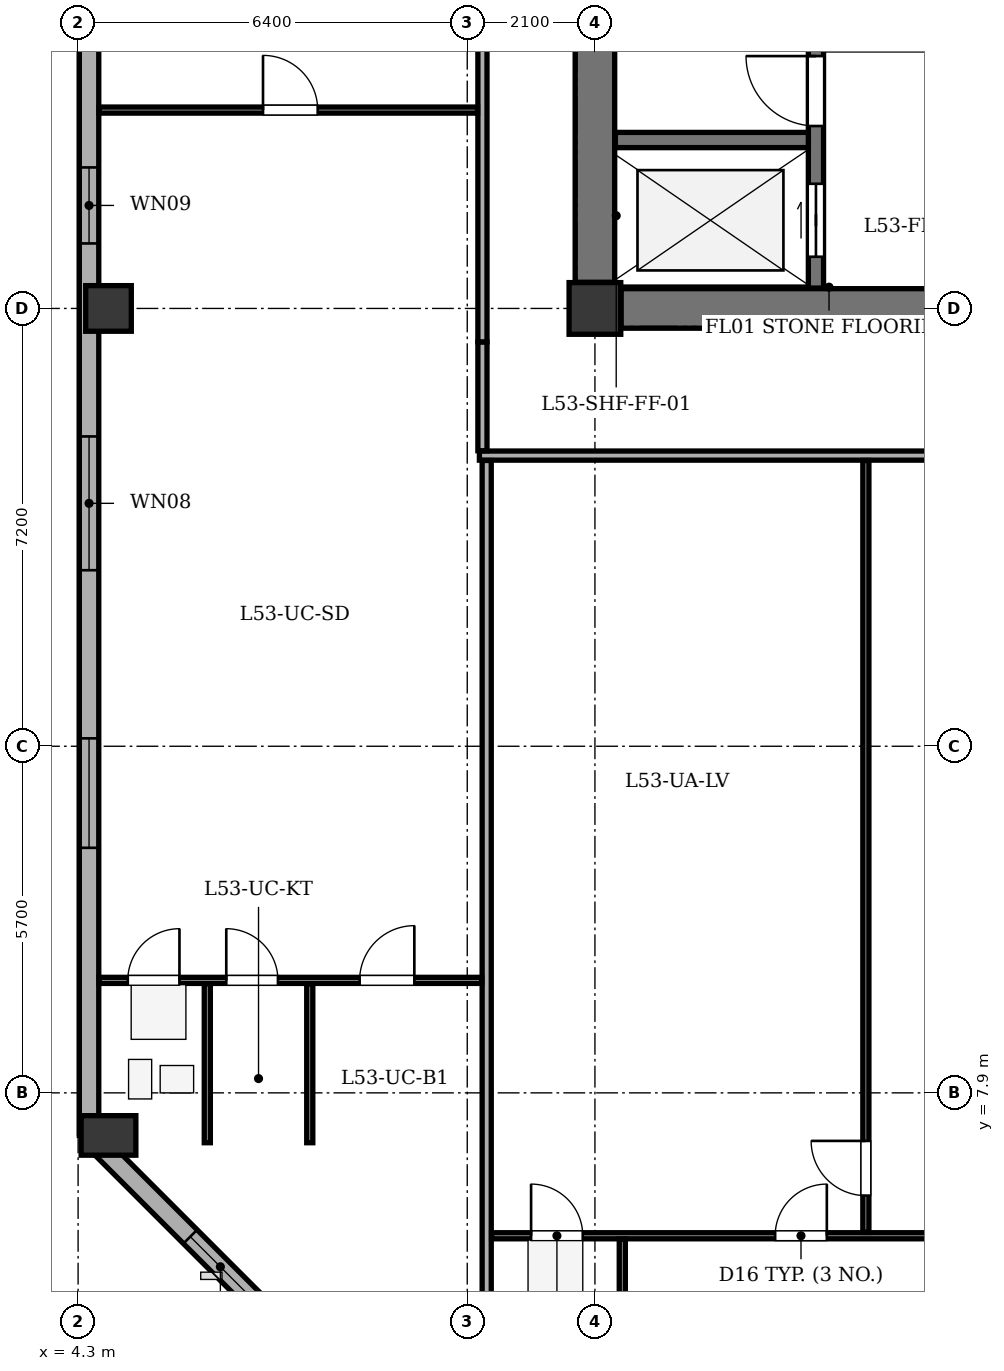
"""IFC4 building model, lengths in metres.
Left out: names, types, materials, properties, quantities, classifications, styles, units other than length and angle.
Written with IfcOpenShell. Run it as: python <this file> out.ifc"""

import sys

from ifc_helpers import new_model, si_unit, direction, frame, frame_2d, origin, origin_2d, place, context, subcontext, project, spatial, rectangle, extrude, element, fill, save


model = new_model("IFC4")
c1 = context("Model", 3, precision=1e-05, world=origin(), true_north=direction((0.0, 1.0)))
c2 = subcontext(c1, "Body", "Model", "MODEL_VIEW")
j1 = project(units=[si_unit("LENGTHUNIT", "METRE"), si_unit("PLANEANGLEUNIT", "RADIAN")], contexts=[c1])
p1 = place(None, origin())
s1 = spatial("IfcSite", under=j1, at=p1, CompositionType="ELEMENT")
p2 = place(p1, origin())
s2 = spatial("IfcBuilding", under=s1, at=p2, CompositionType="ELEMENT")
p3 = place(p2, frame((0.0, 0.0, 207.5)))
s3 = spatial("IfcBuildingStorey", under=s2, at=p3, CompositionType="ELEMENT", Elevation=207.5)
p4 = place(p3, frame((12.8, 20.8, 0.0), z_axis=(0.0, 0.0, 1.0), x_axis=(1.0, 0.0, 0.0)))
e1 = element("IfcColumn", 1, at=p4, inside=s3, PredefinedType="COLUMN", context=c2, shape_type="SweptSolid", body=[
    extrude(rectangle(XDim=0.85, YDim=0.85, at=origin_2d()), origin(), (0.0, 0.0, 1.0), 3.4),
])
p5 = place(p3, frame((4.8, 7.2, 0.0), z_axis=(0.0, 0.0, 1.0), x_axis=(1.0, 0.0, 0.0)))
e2 = element("IfcColumn", 2, at=p5, inside=s3, PredefinedType="COLUMN", context=c2, shape_type="SweptSolid", body=[
    extrude(rectangle(XDim=0.65, YDim=0.9, at=origin_2d()), origin(), (0.0, 0.0, 1.0), 3.4),
])
p6 = place(p3, frame((4.8, 20.8, 0.0), z_axis=(0.0, 0.0, 1.0), x_axis=(1.0, 0.0, 0.0)))
e3 = element("IfcColumn", 3, at=p6, inside=s3, PredefinedType="COLUMN", context=c2, shape_type="SweptSolid", body=[
    extrude(rectangle(XDim=0.75, YDim=0.75, at=origin_2d()), origin(), (0.0, 0.0, 1.0), 3.4),
])
p7 = place(p3, frame((8.8, 2.88, 0.0), z_axis=(0.0, 0.0, 1.0), x_axis=(-0.707106781187, 0.707106781187, 0.0)))
e4 = element("IfcWall", 4, at=p7, inside=s3, PredefinedType="STANDARD", context=c2, shape_type="SweptSolid", body=[
    extrude(rectangle(XDim=6.11, YDim=0.32, at=frame_2d((3.055, 0.0))), origin(), (0.0, 0.0, 1.0), 2.725),
])
p8 = place(p7, frame((2.355, 0.0, 0.75)))
e5 = element("IfcOpeningElement", 5, at=p8, cuts=e4, PredefinedType="OPENING", context=c2, shape_type="SweptSolid", body=[
    extrude(rectangle(XDim=1.4, YDim=1.65, at=frame_2d((0.7, 0.825))), frame((0.0, 0.17, 0.0), z_axis=(0.0, -1.0, 0.0), x_axis=(1.0, 0.0, 0.0)), (0.0, 0.0, 1.0), 0.34),
])
p9 = place(p3, frame((4.48, 7.2, 0.0), z_axis=(0.0, 0.0, 1.0), x_axis=(0.0, 1.0, 0.0)))
e6 = element("IfcWall", 6, at=p9, inside=s3, PredefinedType="STANDARD", context=c2, shape_type="SweptSolid", body=[
    extrude(rectangle(XDim=27.8, YDim=0.32, at=frame_2d((13.9, 0.0))), origin(), (0.0, 0.0, 1.0), 2.725),
])
p10 = place(p9, frame((4.73, 0.0, 0.75)))
e7 = element("IfcOpeningElement", 7, at=p10, cuts=e6, PredefinedType="OPENING", context=c2, shape_type="SweptSolid", body=[
    extrude(rectangle(XDim=1.8, YDim=1.7, at=frame_2d((0.9, 0.85))), frame((0.0, 0.17, 0.0), z_axis=(0.0, -1.0, 0.0), x_axis=(1.0, 0.0, 0.0)), (0.0, 0.0, 1.0), 0.34),
])
p11 = place(p9, frame((9.295, 0.0, 0.75)))
e8 = element("IfcOpeningElement", 8, at=p11, cuts=e6, PredefinedType="OPENING", context=c2, shape_type="SweptSolid", body=[
    extrude(rectangle(XDim=2.2, YDim=1.7, at=frame_2d((1.1, 0.85))), frame((0.0, 0.17, 0.0), z_axis=(0.0, -1.0, 0.0), x_axis=(1.0, 0.0, 0.0)), (0.0, 0.0, 1.0), 0.34),
])
p12 = place(p9, frame((14.669, 0.0, 0.75)))
e9 = element("IfcOpeningElement", 9, at=p12, cuts=e6, PredefinedType="OPENING", context=c2, shape_type="SweptSolid", body=[
    extrude(rectangle(XDim=1.25, YDim=1.7, at=frame_2d((0.625, 0.85))), frame((0.0, 0.17, 0.0), z_axis=(0.0, -1.0, 0.0), x_axis=(1.0, 0.0, 0.0)), (0.0, 0.0, 1.0), 0.34),
])
p13 = place(p9, frame((18.649, 0.0, 0.75)))
e10 = element("IfcOpeningElement", 10, at=p13, cuts=e6, PredefinedType="OPENING", context=c2, shape_type="SweptSolid", body=[
    extrude(rectangle(XDim=1.8, YDim=1.7, at=frame_2d((0.9, 0.85))), frame((0.0, 0.17, 0.0), z_axis=(0.0, -1.0, 0.0), x_axis=(1.0, 0.0, 0.0)), (0.0, 0.0, 1.0), 0.34),
])
p14 = place(p9, frame((22.488, 0.0, 0.75)))
e11 = element("IfcOpeningElement", 11, at=p14, cuts=e6, PredefinedType="OPENING", context=c2, shape_type="SweptSolid", body=[
    extrude(rectangle(XDim=2.2, YDim=1.7, at=frame_2d((1.1, 0.85))), frame((0.0, 0.17, 0.0), z_axis=(0.0, -1.0, 0.0), x_axis=(1.0, 0.0, 0.0)), (0.0, 0.0, 1.0), 0.34),
])
p15 = place(p3, frame((12.8, 21.23, 0.0), z_axis=(0.0, 0.0, 1.0), x_axis=(0.0, 1.0, 0.0)))
e12 = element("IfcWall", 12, at=p15, inside=s3, PredefinedType="SHEAR", context=c2, shape_type="SweptSolid", body=[
    extrude(rectangle(XDim=11.94, YDim=0.65, at=frame_2d((5.97, 0.0))), origin(), (0.0, 0.0, 1.0), 3.1),
])
p16 = place(p3, frame((13.23, 20.8, 0.0), z_axis=(0.0, 0.0, 1.0), x_axis=(1.0, 0.0, 0.0)))
e13 = element("IfcWall", 13, at=p16, inside=s3, PredefinedType="SHEAR", context=c2, shape_type="SweptSolid", body=[
    extrude(rectangle(XDim=7.14, YDim=0.65, at=frame_2d((3.57, 0.0))), origin(), (0.0, 0.0, 1.0), 3.1),
])
p17 = place(p3, frame((16.435, 21.135, 0.0), z_axis=(0.0, 0.0, 1.0), x_axis=(0.0, 1.0, 0.0)))
e14 = element("IfcWall", 14, at=p17, inside=s3, PredefinedType="SHEAR", context=c2, shape_type="SweptSolid", body=[
    extrude(rectangle(XDim=12.13, YDim=0.25, at=frame_2d((6.065, 0.0))), origin(), (0.0, 0.0, 1.0), 3.1),
])
p18 = place(p17, frame((0.515, 0.0, 0.0)))
e15 = element("IfcOpeningElement", 15, at=p18, cuts=e14, PredefinedType="OPENING", context=c2, shape_type="SweptSolid", body=[
    extrude(rectangle(XDim=1.2, YDim=2.15, at=frame_2d((0.6, 1.075))), frame((0.0, 0.135, 0.0), z_axis=(0.0, -1.0, 0.0), x_axis=(1.0, 0.0, 0.0)), (0.0, 0.0, 1.0), 0.27),
])
p19 = place(p17, frame((2.665, 0.0, 0.0)))
e16 = element("IfcOpeningElement", 16, at=p19, cuts=e14, PredefinedType="OPENING", context=c2, shape_type="SweptSolid", body=[
    extrude(rectangle(XDim=1.15, YDim=2.15, at=frame_2d((0.575, 1.075))), frame((0.0, 0.135, 0.0), z_axis=(0.0, -1.0, 0.0), x_axis=(1.0, 0.0, 0.0)), (0.0, 0.0, 1.0), 0.27),
])
p20 = place(p3, frame((13.135, 23.57, 0.0), z_axis=(0.0, 0.0, 1.0), x_axis=(1.0, 0.0, 0.0)))
e17 = element("IfcWall", 17, at=p20, inside=s3, PredefinedType="SHEAR", context=c2, shape_type="SweptSolid", body=[
    extrude(rectangle(XDim=3.175, YDim=0.25, at=frame_2d((1.587, 0.0))), origin(), (0.0, 0.0, 1.0), 3.1),
])
p21 = place(p3, frame((10.9, 18.38, 0.0), z_axis=(0.0, 0.0, 1.0), x_axis=(1.0, 0.0, 0.0)))
e18 = element("IfcWall", 18, at=p21, inside=s3, PredefinedType="PARTITIONING", context=c2, shape_type="SweptSolid", body=[
    extrude(rectangle(XDim=34.02, YDim=0.15, at=frame_2d((17.01, 0.0))), origin(), (0.0, 0.0, 1.0), 3.1),
])
p22 = place(p21, frame((7.727, 0.0, 0.0)))
e19 = element("IfcOpeningElement", 19, at=p22, cuts=e18, PredefinedType="OPENING", context=c2, shape_type="SweptSolid", body=[
    extrude(rectangle(XDim=1.0, YDim=2.1, at=frame_2d((0.5, 1.05))), frame((0.0, 0.085, 0.0), z_axis=(0.0, -1.0, 0.0), x_axis=(1.0, 0.0, 0.0)), (0.0, 0.0, 1.0), 0.17),
])
p23 = place(p21, frame((24.617, 0.0, 0.0)))
e20 = element("IfcOpeningElement", 20, at=p23, cuts=e18, PredefinedType="OPENING", context=c2, shape_type="SweptSolid", body=[
    extrude(rectangle(XDim=1.0, YDim=2.1, at=frame_2d((0.5, 1.05))), frame((0.0, 0.085, 0.0), z_axis=(0.0, -1.0, 0.0), x_axis=(1.0, 0.0, 0.0)), (0.0, 0.0, 1.0), 0.17),
])
p24 = place(p3, frame((11.02, 3.045, 0.0), z_axis=(0.0, 0.0, 1.0), x_axis=(0.0, 1.0, 0.0)))
e21 = element("IfcWall", 21, at=p24, inside=s3, PredefinedType="PARTITIONING", context=c2, shape_type="SweptSolid", body=[
    extrude(rectangle(XDim=15.255, YDim=0.15, at=frame_2d((7.627, 0.0))), origin(), (0.0, 0.0, 1.0), 3.1),
])
p25 = place(p3, frame((11.1, 5.55, 0.0), z_axis=(0.0, 0.0, 1.0), x_axis=(1.0, 0.0, 0.0)))
e22 = element("IfcWall", 22, at=p25, inside=s3, PredefinedType="PARTITIONING", context=c2, shape_type="SweptSolid", body=[
    extrude(rectangle(XDim=16.174, YDim=0.1, at=frame_2d((8.087, 0.0))), origin(), (0.0, 0.0, 1.0), 3.1),
])
p26 = place(p25, frame((0.65, 0.0, 0.0)))
e23 = element("IfcOpeningElement", 23, at=p26, cuts=e22, PredefinedType="OPENING", context=c2, shape_type="SweptSolid", body=[
    extrude(rectangle(XDim=0.85, YDim=2.05, at=frame_2d((0.425, 1.025))), frame((0.0, 0.06, 0.0), z_axis=(0.0, -1.0, 0.0), x_axis=(1.0, 0.0, 0.0)), (0.0, 0.0, 1.0), 0.12),
])
p27 = place(p25, frame((4.664, 0.0, 0.0)))
e24 = element("IfcOpeningElement", 24, at=p27, cuts=e22, PredefinedType="OPENING", context=c2, shape_type="SweptSolid", body=[
    extrude(rectangle(XDim=0.85, YDim=2.05, at=frame_2d((0.425, 1.025))), frame((0.0, 0.06, 0.0), z_axis=(0.0, -1.0, 0.0), x_axis=(1.0, 0.0, 0.0)), (0.0, 0.0, 1.0), 0.12),
])
p28 = place(p25, frame((9.584, 0.0, 0.0)))
e25 = element("IfcOpeningElement", 25, at=p28, cuts=e22, PredefinedType="OPENING", context=c2, shape_type="SweptSolid", body=[
    extrude(rectangle(XDim=0.9, YDim=2.05, at=frame_2d((0.45, 1.025))), frame((0.0, 0.06, 0.0), z_axis=(0.0, -1.0, 0.0), x_axis=(1.0, 0.0, 0.0)), (0.0, 0.0, 1.0), 0.12),
])
p29 = place(p25, frame((13.598, 0.0, 0.0)))
e26 = element("IfcOpeningElement", 26, at=p29, cuts=e22, PredefinedType="OPENING", context=c2, shape_type="SweptSolid", body=[
    extrude(rectangle(XDim=0.9, YDim=2.05, at=frame_2d((0.45, 1.025))), frame((0.0, 0.06, 0.0), z_axis=(0.0, -1.0, 0.0), x_axis=(1.0, 0.0, 0.0)), (0.0, 0.0, 1.0), 0.12),
])
p30 = place(p3, frame((17.256, 5.605, 0.0), z_axis=(0.0, 0.0, 1.0), x_axis=(0.0, 1.0, 0.0)))
e27 = element("IfcWall", 27, at=p30, inside=s3, PredefinedType="PARTITIONING", context=c2, shape_type="SweptSolid", body=[
    extrude(rectangle(XDim=12.695, YDim=0.1, at=frame_2d((6.348, 0.0))), origin(), (0.0, 0.0, 1.0), 3.1),
])
p31 = place(p30, frame((0.605, 0.0, 0.0)))
e28 = element("IfcOpeningElement", 28, at=p31, cuts=e27, PredefinedType="OPENING", context=c2, shape_type="SweptSolid", body=[
    extrude(rectangle(XDim=0.9, YDim=2.05, at=frame_2d((0.45, 1.025))), frame((0.0, 0.06, 0.0), z_axis=(0.0, -1.0, 0.0), x_axis=(1.0, 0.0, 0.0)), (0.0, 0.0, 1.0), 0.12),
])
p32 = place(p3, frame((13.25, 3.045, 0.0), z_axis=(0.0, 0.0, 1.0), x_axis=(0.0, 1.0, 0.0)))
e29 = element("IfcWall", 29, at=p32, inside=s3, PredefinedType="PARTITIONING", context=c2, shape_type="SweptSolid", body=[
    extrude(rectangle(XDim=2.45, YDim=0.1, at=frame_2d((1.225, 0.0))), origin(), (0.0, 0.0, 1.0), 3.1),
])
p33 = place(p3, frame((10.95, 18.46, 0.0), z_axis=(0.0, 0.0, 1.0), x_axis=(0.0, 1.0, 0.0)))
e30 = element("IfcWall", 30, at=p33, inside=s3, PredefinedType="PARTITIONING", context=c2, shape_type="SweptSolid", body=[
    extrude(rectangle(XDim=1.79, YDim=0.15, at=frame_2d((0.895, 0.0))), origin(), (0.0, 0.0, 1.0), 3.1),
])
p34 = place(p3, frame((10.95, 20.25, 0.0), z_axis=(0.0, 0.0, 1.0), x_axis=(0.0, 1.0, 0.0)))
e31 = element("IfcWall", 31, at=p34, inside=s3, PredefinedType="PARTITIONING", context=c2, shape_type="SweptSolid", body=[
    extrude(rectangle(XDim=13.9, YDim=0.15, at=frame_2d((6.95, 0.0))), origin(), (0.0, 0.0, 1.0), 3.1),
])
p35 = place(p3, frame((4.645, 9.75, 0.0), z_axis=(0.0, 0.0, 1.0), x_axis=(1.0, 0.0, 0.0)))
e32 = element("IfcWall", 32, at=p35, inside=s3, PredefinedType="PARTITIONING", context=c2, shape_type="SweptSolid", body=[
    extrude(rectangle(XDim=6.295, YDim=0.1, at=frame_2d((3.147, 0.0))), origin(), (0.0, 0.0, 1.0), 3.1),
])
p36 = place(p35, frame((0.472, 0.0, 0.0)))
e33 = element("IfcOpeningElement", 33, at=p36, cuts=e32, PredefinedType="OPENING", context=c2, shape_type="SweptSolid", body=[
    extrude(rectangle(XDim=0.85, YDim=2.05, at=frame_2d((0.425, 1.025))), frame((0.0, 0.06, 0.0), z_axis=(0.0, -1.0, 0.0), x_axis=(1.0, 0.0, 0.0)), (0.0, 0.0, 1.0), 0.12),
])
p37 = place(p35, frame((2.092, 0.0, 0.0)))
e34 = element("IfcOpeningElement", 34, at=p37, cuts=e32, PredefinedType="OPENING", context=c2, shape_type="SweptSolid", body=[
    extrude(rectangle(XDim=0.85, YDim=2.05, at=frame_2d((0.425, 1.025))), frame((0.0, 0.06, 0.0), z_axis=(0.0, -1.0, 0.0), x_axis=(1.0, 0.0, 0.0)), (0.0, 0.0, 1.0), 0.12),
])
p38 = place(p35, frame((4.285, 0.0, 0.0)))
e35 = element("IfcOpeningElement", 35, at=p38, cuts=e32, PredefinedType="OPENING", context=c2, shape_type="SweptSolid", body=[
    extrude(rectangle(XDim=0.9, YDim=2.05, at=frame_2d((0.45, 1.025))), frame((0.0, 0.06, 0.0), z_axis=(0.0, -1.0, 0.0), x_axis=(1.0, 0.0, 0.0)), (0.0, 0.0, 1.0), 0.12),
])
p39 = place(p3, frame((4.645, 24.062, 0.0), z_axis=(0.0, 0.0, 1.0), x_axis=(1.0, 0.0, 0.0)))
e36 = element("IfcWall", 36, at=p39, inside=s3, PredefinedType="PARTITIONING", context=c2, shape_type="SweptSolid", body=[
    extrude(rectangle(XDim=6.225, YDim=0.1, at=frame_2d((3.113, 0.0))), origin(), (0.0, 0.0, 1.0), 3.1),
])
p40 = place(p39, frame((2.696, 0.0, 0.0)))
e37 = element("IfcOpeningElement", 37, at=p40, cuts=e36, PredefinedType="OPENING", context=c2, shape_type="SweptSolid", body=[
    extrude(rectangle(XDim=0.9, YDim=2.05, at=frame_2d((0.45, 1.025))), frame((0.0, 0.06, 0.0), z_axis=(0.0, -1.0, 0.0), x_axis=(1.0, 0.0, 0.0)), (0.0, 0.0, 1.0), 0.12),
])
for number, where, z_axis, x_axis in (
    (38, (6.425, 7.08, 0.0), (0.0, 0.0, 1.0), (0.0, 1.0, 0.0)),
    (39, (8.11, 7.08, 0.0), (0.0, 0.0, 1.0), (0.0, 1.0, 0.0)),
):
    element("IfcWall", number, at=place(p3, frame(where, z_axis=z_axis, x_axis=x_axis)), inside=s3, PredefinedType="PARTITIONING", context=c2, shape_type="SweptSolid", body=[
        extrude(rectangle(XDim=2.615, YDim=0.1, at=frame_2d((1.308, 0.0))), origin(), (0.0, 0.0, 1.0), 3.1),
    ])
p41 = place(p10, origin())
e40 = element("IfcWindow", 40, at=p41, inside=s3, PartitioningType="SINGLE_PANEL", PredefinedType="WINDOW", context=c2, shape_type="SweptSolid", body=[
    extrude(rectangle(XDim=1.8, YDim=1.7, at=frame_2d((0.9, 0.85))), frame((0.0, -0.01, 0.0), z_axis=(0.0, -1.0, 0.0), x_axis=(1.0, 0.0, 0.0)), (0.0, 0.0, 1.0), 0.06),
])
fill(e7, e40)
p42 = place(p11, origin())
e41 = element("IfcWindow", 41, at=p42, inside=s3, PartitioningType="SINGLE_PANEL", PredefinedType="WINDOW", context=c2, shape_type="SweptSolid", body=[
    extrude(rectangle(XDim=2.2, YDim=1.7, at=frame_2d((1.1, 0.85))), frame((0.0, -0.01, 0.0), z_axis=(0.0, -1.0, 0.0), x_axis=(1.0, 0.0, 0.0)), (0.0, 0.0, 1.0), 0.06),
])
fill(e8, e41)
p43 = place(p12, origin())
e42 = element("IfcWindow", 42, at=p43, inside=s3, PartitioningType="SINGLE_PANEL", PredefinedType="WINDOW", context=c2, shape_type="SweptSolid", body=[
    extrude(rectangle(XDim=1.25, YDim=1.7, at=frame_2d((0.625, 0.85))), frame((0.0, -0.01, 0.0), z_axis=(0.0, -1.0, 0.0), x_axis=(1.0, 0.0, 0.0)), (0.0, 0.0, 1.0), 0.06),
])
fill(e9, e42)
p44 = place(p8, origin())
e43 = element("IfcWindow", 43, at=p44, inside=s3, PartitioningType="SINGLE_PANEL", PredefinedType="WINDOW", context=c2, shape_type="SweptSolid", body=[
    extrude(rectangle(XDim=1.4, YDim=1.65, at=frame_2d((0.7, 0.825))), frame((0.0, -0.01, 0.0), z_axis=(0.0, -1.0, 0.0), x_axis=(1.0, 0.0, 0.0)), (0.0, 0.0, 1.0), 0.06),
])
fill(e5, e43)
p45 = place(p18, origin())
e44 = element("IfcDoor", 44, at=p45, inside=s3, OperationType="DOUBLE_DOOR_SLIDING", PredefinedType="DOOR", context=c2, shape_type="SweptSolid", body=[
    extrude(rectangle(XDim=1.2, YDim=2.15, at=frame_2d((0.6, 1.075))), frame((0.0, 0.025, 0.0), z_axis=(0.0, -1.0, 0.0), x_axis=(1.0, 0.0, 0.0)), (0.0, 0.0, 1.0), 0.05),
])
fill(e15, e44)
p46 = place(p19, origin())
e45 = element("IfcDoor", 45, at=p46, inside=s3, OperationType="SINGLE_SWING_RIGHT", PredefinedType="DOOR", context=c2, shape_type="SweptSolid", body=[
    extrude(rectangle(XDim=1.15, YDim=2.15, at=frame_2d((0.575, 1.075))), frame((0.0, 0.025, 0.0), z_axis=(0.0, -1.0, 0.0), x_axis=(1.0, 0.0, 0.0)), (0.0, 0.0, 1.0), 0.05),
])
fill(e16, e45)
p47 = place(p31, origin())
e46 = element("IfcDoor", 46, at=p47, inside=s3, OperationType="SINGLE_SWING_RIGHT", PredefinedType="DOOR", context=c2, shape_type="SweptSolid", body=[
    extrude(rectangle(XDim=0.9, YDim=2.05, at=frame_2d((0.45, 1.025))), frame((0.0, 0.025, 0.0), z_axis=(0.0, -1.0, 0.0), x_axis=(1.0, 0.0, 0.0)), (0.0, 0.0, 1.0), 0.05),
])
fill(e28, e46)
p48 = place(p26, origin())
e47 = element("IfcDoor", 47, at=p48, inside=s3, OperationType="SINGLE_SWING_LEFT", PredefinedType="DOOR", context=c2, shape_type="SweptSolid", body=[
    extrude(rectangle(XDim=0.85, YDim=2.05, at=frame_2d((0.425, 1.025))), frame((0.0, 0.025, 0.0), z_axis=(0.0, -1.0, 0.0), x_axis=(1.0, 0.0, 0.0)), (0.0, 0.0, 1.0), 0.05),
])
fill(e23, e47)
p49 = place(p27, origin())
e48 = element("IfcDoor", 48, at=p49, inside=s3, OperationType="SINGLE_SWING_RIGHT", PredefinedType="DOOR", context=c2, shape_type="SweptSolid", body=[
    extrude(rectangle(XDim=0.85, YDim=2.05, at=frame_2d((0.425, 1.025))), frame((0.0, 0.025, 0.0), z_axis=(0.0, -1.0, 0.0), x_axis=(1.0, 0.0, 0.0)), (0.0, 0.0, 1.0), 0.05),
])
fill(e24, e48)
p50 = place(p40, origin())
e49 = element("IfcDoor", 49, at=p50, inside=s3, OperationType="SINGLE_SWING_LEFT", PredefinedType="DOOR", context=c2, shape_type="SweptSolid", body=[
    extrude(rectangle(XDim=0.9, YDim=2.05, at=frame_2d((0.45, 1.025))), frame((0.0, 0.025, 0.0), z_axis=(0.0, -1.0, 0.0), x_axis=(1.0, 0.0, 0.0)), (0.0, 0.0, 1.0), 0.05),
])
fill(e37, e49)
p51 = place(p36, origin())
e50 = element("IfcDoor", 50, at=p51, inside=s3, OperationType="SINGLE_SWING_RIGHT", PredefinedType="DOOR", context=c2, shape_type="SweptSolid", body=[
    extrude(rectangle(XDim=0.85, YDim=2.05, at=frame_2d((0.425, 1.025))), frame((0.0, 0.025, 0.0), z_axis=(0.0, -1.0, 0.0), x_axis=(1.0, 0.0, 0.0)), (0.0, 0.0, 1.0), 0.05),
])
fill(e33, e50)
p52 = place(p37, origin())
e51 = element("IfcDoor", 51, at=p52, inside=s3, OperationType="SINGLE_SWING_LEFT", PredefinedType="DOOR", context=c2, shape_type="SweptSolid", body=[
    extrude(rectangle(XDim=0.85, YDim=2.05, at=frame_2d((0.425, 1.025))), frame((0.0, 0.025, 0.0), z_axis=(0.0, -1.0, 0.0), x_axis=(1.0, 0.0, 0.0)), (0.0, 0.0, 1.0), 0.05),
])
fill(e34, e51)
p53 = place(p38, origin())
e52 = element("IfcDoor", 52, at=p53, inside=s3, OperationType="SINGLE_SWING_RIGHT", PredefinedType="DOOR", context=c2, shape_type="SweptSolid", body=[
    extrude(rectangle(XDim=0.9, YDim=2.05, at=frame_2d((0.45, 1.025))), frame((0.0, 0.025, 0.0), z_axis=(0.0, -1.0, 0.0), x_axis=(1.0, 0.0, 0.0)), (0.0, 0.0, 1.0), 0.05),
])
fill(e35, e52)
save(model, sys.argv[1])
